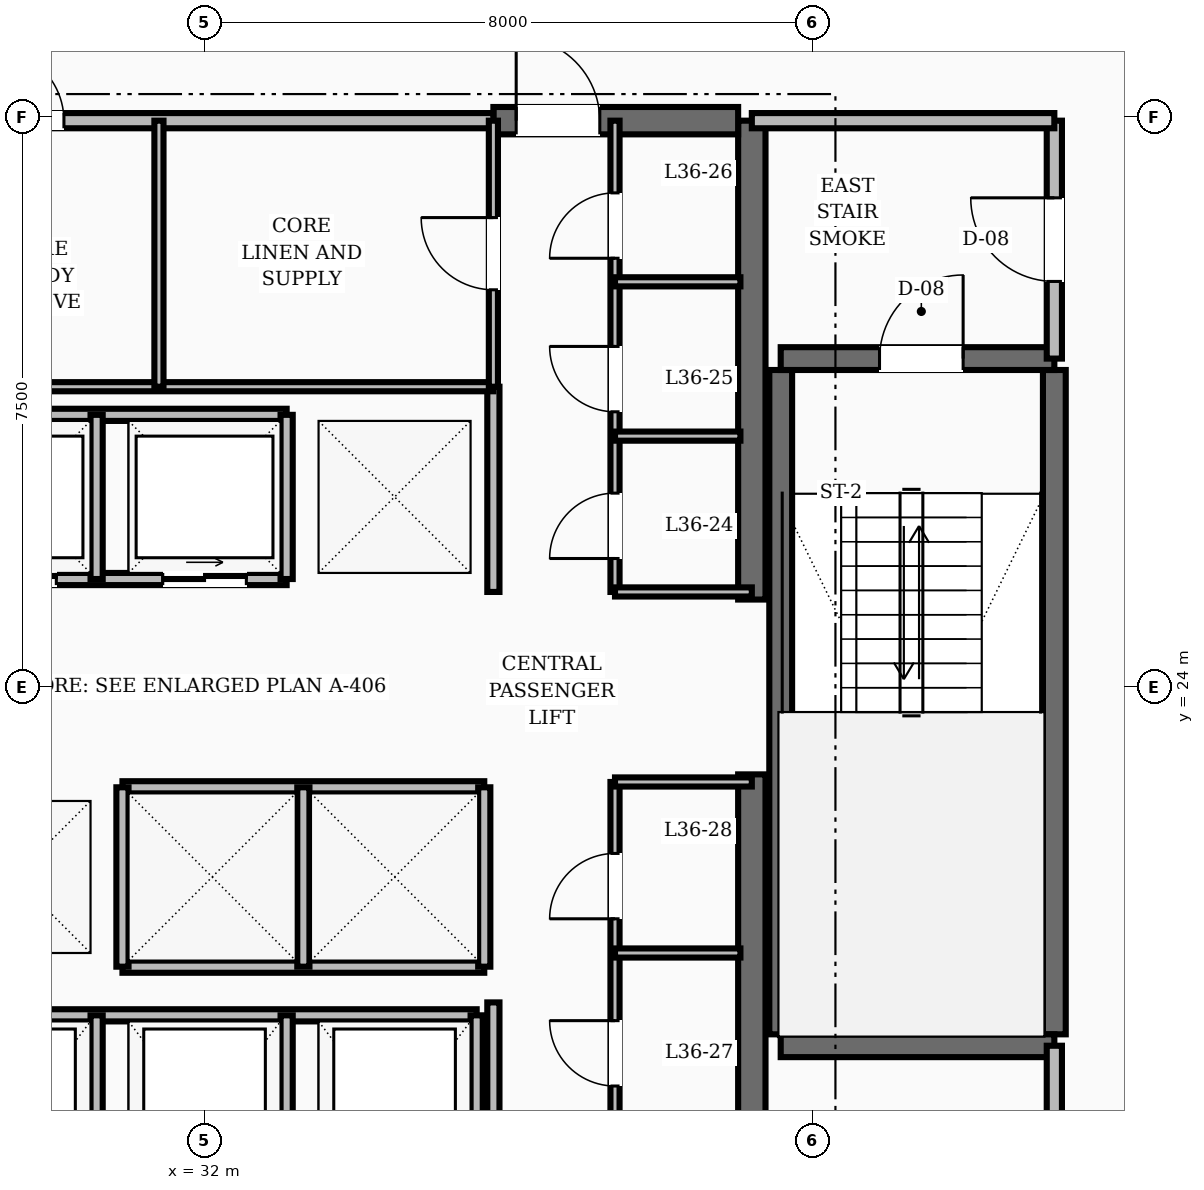
"""IFC4 building model, lengths in metres.
Left out: names, types, materials, properties, quantities, classifications, styles, units other than length and angle.
Written with IfcOpenShell. Run it as: python <this file> out.ifc"""

import sys

from ifc_helpers import new_model, si_unit, direction, frame, frame_2d, origin, place, context, subcontext, project, spatial, rectangle, extrude, element, fill, save


model = new_model("IFC4")
c1 = context("Model", 3, precision=1e-05, world=origin(), true_north=direction((0.0, 1.0)))
c2 = subcontext(c1, "Body", "Model", "MODEL_VIEW")
j1 = project(units=[si_unit("LENGTHUNIT", "METRE"), si_unit("PLANEANGLEUNIT", "RADIAN")], contexts=[c1])
p1 = place(None, origin())
s1 = spatial("IfcSite", under=j1, at=p1, CompositionType="ELEMENT")
p2 = place(p1, origin())
s2 = spatial("IfcBuilding", under=s1, at=p2, CompositionType="ELEMENT")
p3 = place(p2, frame((0.0, 0.0, 142.4)))
s3 = spatial("IfcBuildingStorey", under=s2, at=p3, CompositionType="ELEMENT", Elevation=142.4)
for number, where, z_axis, x_axis in (
    (1, (39.2, 16.55, 0.0), (0.0, 0.0, 1.0), (0.0, 1.0, 0.0)),
    (2, (39.2, 25.15, 0.0), (0.0, 0.0, 1.0), (0.0, 1.0, 0.0)),
):
    element("IfcWall", number, at=place(p3, frame(where, z_axis=z_axis, x_axis=x_axis)), inside=s3, PredefinedType="SHEAR", context=c2, shape_type="SweptSolid", body=[
        extrude(rectangle(XDim=6.3, YDim=0.36, at=frame_2d((3.15, 0.0))), origin(), (0.0, 0.0, 1.0), 3.6),
    ])
p4 = place(p3, frame((35.8, 31.45, 0.0), z_axis=(0.0, 0.0, 1.0), x_axis=(1.0, 0.0, 0.0)))
e3 = element("IfcWall", 3, at=p4, inside=s3, PredefinedType="SHEAR", context=c2, shape_type="SweptSolid", body=[
    extrude(rectangle(XDim=3.22, YDim=0.36, at=frame_2d((1.61, 0.0))), origin(), (0.0, 0.0, 1.0), 3.6),
])
p5 = place(p4, frame((0.3, 0.0, 0.0)))
e4 = element("IfcOpeningElement", 4, at=p5, cuts=e3, PredefinedType="OPENING", context=c2, shape_type="SweptSolid", body=[
    extrude(rectangle(XDim=1.1, YDim=2.1, at=frame_2d((0.55, 1.05))), frame((0.0, 0.19, 0.0), z_axis=(0.0, -1.0, 0.0), x_axis=(1.0, 0.0, 0.0)), (0.0, 0.0, 1.0), 0.38),
])
for number, where, z_axis, x_axis in (
    (5, (43.18, 19.43, 0.0), (0.0, 0.0, 1.0), (0.0, 1.0, 0.0)),
    (6, (39.58, 19.43, 0.0), (0.0, 0.0, 1.0), (0.0, 1.0, 0.0)),
):
    element("IfcWall", number, at=place(p3, frame(where, z_axis=z_axis, x_axis=x_axis)), inside=s3, PredefinedType="SHEAR", context=c2, shape_type="SweptSolid", body=[
        extrude(rectangle(XDim=8.74, YDim=0.3, at=frame_2d((4.37, 0.0))), origin(), (0.0, 0.0, 1.0), 3.6),
    ])
p6 = place(p3, frame((39.58, 19.28, 0.0), z_axis=(0.0, 0.0, 1.0), x_axis=(1.0, 0.0, 0.0)))
e7 = element("IfcWall", 7, at=p6, inside=s3, PredefinedType="SHEAR", context=c2, shape_type="SweptSolid", body=[
    extrude(rectangle(XDim=3.6, YDim=0.3, at=frame_2d((1.8, 0.0))), origin(), (0.0, 0.0, 1.0), 3.6),
])
p7 = place(p3, frame((39.58, 28.32, 0.0), z_axis=(0.0, 0.0, 1.0), x_axis=(1.0, 0.0, 0.0)))
e8 = element("IfcWall", 8, at=p7, inside=s3, PredefinedType="SHEAR", context=c2, shape_type="SweptSolid", body=[
    extrude(rectangle(XDim=3.6, YDim=0.3, at=frame_2d((1.8, 0.0))), origin(), (0.0, 0.0, 1.0), 3.6),
])
p8 = place(p7, frame((1.3, 0.0, 0.0)))
e9 = element("IfcOpeningElement", 9, at=p8, cuts=e8, PredefinedType="OPENING", context=c2, shape_type="SweptSolid", body=[
    extrude(rectangle(XDim=1.1, YDim=2.1, at=frame_2d((0.55, 1.05))), frame((0.0, 0.16, 0.0), z_axis=(0.0, -1.0, 0.0), x_axis=(1.0, 0.0, 0.0)), (0.0, 0.0, 1.0), 0.32),
])
p9 = place(p3, frame((43.18, 28.32, 0.0), z_axis=(0.0, 0.0, 1.0), x_axis=(0.0, 1.0, 0.0)))
e10 = element("IfcWall", 10, at=p9, inside=s3, PredefinedType="SOLIDWALL", context=c2, shape_type="SweptSolid", body=[
    extrude(rectangle(XDim=3.13, YDim=0.2, at=frame_2d((1.565, 0.0))), origin(), (0.0, 0.0, 1.0), 2.8),
])
p10 = place(p9, frame((1.015, 0.0, 0.0)))
e11 = element("IfcOpeningElement", 11, at=p10, cuts=e10, PredefinedType="OPENING", context=c2, shape_type="SweptSolid", body=[
    extrude(rectangle(XDim=1.1, YDim=2.1, at=frame_2d((0.55, 1.05))), frame((0.0, 0.11, 0.0), z_axis=(0.0, -1.0, 0.0), x_axis=(1.0, 0.0, 0.0)), (0.0, 0.0, 1.0), 0.22),
])
p11 = place(p3, frame((39.2, 31.45, 0.0), z_axis=(0.0, 0.0, 1.0), x_axis=(1.0, 0.0, 0.0)))
e12 = element("IfcWall", 12, at=p11, inside=s3, PredefinedType="SOLIDWALL", context=c2, shape_type="SweptSolid", body=[
    extrude(rectangle(XDim=3.98, YDim=0.2, at=frame_2d((1.99, 0.0))), origin(), (0.0, 0.0, 1.0), 2.8),
])
p12 = place(p3, frame((43.18, 16.55, 0.0), z_axis=(0.0, 0.0, 1.0), x_axis=(0.0, 1.0, 0.0)))
e13 = element("IfcWall", 13, at=p12, inside=s3, PredefinedType="SOLIDWALL", context=c2, shape_type="SweptSolid", body=[
    extrude(rectangle(XDim=2.73, YDim=0.2, at=frame_2d((1.365, 0.0))), origin(), (0.0, 0.0, 1.0), 2.8),
])
p13 = place(p12, frame((0.89, 0.0, 0.0)))
e14 = element("IfcOpeningElement", 14, at=p13, cuts=e13, PredefinedType="OPENING", context=c2, shape_type="SweptSolid", body=[
    extrude(rectangle(XDim=0.95, YDim=2.1, at=frame_2d((0.475, 1.05))), frame((0.0, 0.11, 0.0), z_axis=(0.0, -1.0, 0.0), x_axis=(1.0, 0.0, 0.0)), (0.0, 0.0, 1.0), 0.22),
])
p14 = place(p3, frame((35.8, 16.55, 0.0), z_axis=(0.0, 0.0, 1.0), x_axis=(0.0, 1.0, 0.0)))
e15 = element("IfcWall", 15, at=p14, inside=s3, PredefinedType="SOLIDWALL", context=c2, shape_type="SweptSolid", body=[
    extrude(rectangle(XDim=3.3, YDim=0.16, at=frame_2d((1.65, 0.0))), origin(), (0.0, 0.0, 1.0), 2.8),
])
p15 = place(p3, frame((35.8, 25.25, 0.0), z_axis=(0.0, 0.0, 1.0), x_axis=(0.0, 1.0, 0.0)))
e16 = element("IfcWall", 16, at=p15, inside=s3, PredefinedType="SOLIDWALL", context=c2, shape_type="SweptSolid", body=[
    extrude(rectangle(XDim=2.7, YDim=0.16, at=frame_2d((1.35, 0.0))), origin(), (0.0, 0.0, 1.0), 2.8),
])
p16 = place(p3, frame((28.42, 25.42, 0.0), z_axis=(0.0, 0.0, 1.0), x_axis=(1.0, 0.0, 0.0)))
e17 = element("IfcWall", 17, at=p16, inside=s3, PredefinedType="SOLIDWALL", context=c2, shape_type="SweptSolid", body=[
    extrude(rectangle(XDim=4.66, YDim=0.16, at=frame_2d((2.33, 0.0))), origin(), (0.0, 0.0, 1.0), 2.8),
])
p17 = place(p16, frame((0.53, 0.0, 0.0)))
e18 = element("IfcOpeningElement", 18, at=p17, cuts=e17, PredefinedType="OPENING", context=c2, shape_type="SweptSolid", body=[
    extrude(rectangle(XDim=1.1, YDim=2.15, at=frame_2d((0.55, 1.075))), frame((0.0, 0.09, 0.0), z_axis=(0.0, -1.0, 0.0), x_axis=(1.0, 0.0, 0.0)), (0.0, 0.0, 1.0), 0.18),
])
p18 = place(p16, frame((3.03, 0.0, 0.0)))
e19 = element("IfcOpeningElement", 19, at=p18, cuts=e17, PredefinedType="OPENING", context=c2, shape_type="SweptSolid", body=[
    extrude(rectangle(XDim=1.1, YDim=2.15, at=frame_2d((0.55, 1.075))), frame((0.0, 0.09, 0.0), z_axis=(0.0, -1.0, 0.0), x_axis=(1.0, 0.0, 0.0)), (0.0, 0.0, 1.0), 0.18),
])
p19 = place(p3, frame((28.42, 27.58, 0.0), z_axis=(0.0, 0.0, 1.0), x_axis=(1.0, 0.0, 0.0)))
e20 = element("IfcWall", 20, at=p19, inside=s3, PredefinedType="SOLIDWALL", context=c2, shape_type="SweptSolid", body=[
    extrude(rectangle(XDim=4.66, YDim=0.16, at=frame_2d((2.33, 0.0))), origin(), (0.0, 0.0, 1.0), 2.8),
])
for number, where, z_axis, x_axis in (
    (21, (30.58, 25.42, 0.0), (0.0, 0.0, 1.0), (0.0, 1.0, 0.0)),
    (22, (33.08, 25.42, 0.0), (0.0, 0.0, 1.0), (0.0, 1.0, 0.0)),
):
    element("IfcWall", number, at=place(p3, frame(where, z_axis=z_axis, x_axis=x_axis)), inside=s3, PredefinedType="SOLIDWALL", context=c2, shape_type="SweptSolid", body=[
        extrude(rectangle(XDim=2.16, YDim=0.16, at=frame_2d((1.08, 0.0))), origin(), (0.0, 0.0, 1.0), 2.8),
    ])
for number, where, z_axis, x_axis in (
    (23, (30.92, 22.68, 0.0), (0.0, 0.0, 1.0), (1.0, 0.0, 0.0)),
    (24, (30.92, 20.32, 0.0), (0.0, 0.0, 1.0), (1.0, 0.0, 0.0)),
):
    element("IfcWall", number, at=place(p3, frame(where, z_axis=z_axis, x_axis=x_axis)), inside=s3, PredefinedType="SOLIDWALL", context=c2, shape_type="SweptSolid", body=[
        extrude(rectangle(XDim=4.76, YDim=0.16, at=frame_2d((2.38, 0.0))), origin(), (0.0, 0.0, 1.0), 2.8),
    ])
for number, where, z_axis, x_axis in (
    (25, (30.92, 20.32, 0.0), (0.0, 0.0, 1.0), (0.0, 1.0, 0.0)),
    (26, (33.3, 20.32, 0.0), (0.0, 0.0, 1.0), (0.0, 1.0, 0.0)),
    (27, (35.68, 20.32, 0.0), (0.0, 0.0, 1.0), (0.0, 1.0, 0.0)),
):
    element("IfcWall", number, at=place(p3, frame(where, z_axis=z_axis, x_axis=x_axis)), inside=s3, PredefinedType="SOLIDWALL", context=c2, shape_type="SweptSolid", body=[
        extrude(rectangle(XDim=2.36, YDim=0.16, at=frame_2d((1.18, 0.0))), origin(), (0.0, 0.0, 1.0), 2.8),
    ])
p20 = place(p3, frame((28.42, 19.68, 0.0), z_axis=(0.0, 0.0, 1.0), x_axis=(1.0, 0.0, 0.0)))
e28 = element("IfcWall", 28, at=p20, inside=s3, PredefinedType="SOLIDWALL", context=c2, shape_type="SweptSolid", body=[
    extrude(rectangle(XDim=7.16, YDim=0.16, at=frame_2d((3.58, 0.0))), origin(), (0.0, 0.0, 1.0), 2.8),
])
for number, where, z_axis, x_axis in (
    (29, (30.58, 16.92, 0.0), (0.0, 0.0, 1.0), (0.0, 1.0, 0.0)),
    (30, (33.08, 16.92, 0.0), (0.0, 0.0, 1.0), (0.0, 1.0, 0.0)),
    (31, (35.58, 16.92, 0.0), (0.0, 0.0, 1.0), (0.0, 1.0, 0.0)),
):
    element("IfcWall", number, at=place(p3, frame(where, z_axis=z_axis, x_axis=x_axis)), inside=s3, PredefinedType="SOLIDWALL", context=c2, shape_type="SweptSolid", body=[
        extrude(rectangle(XDim=2.76, YDim=0.16, at=frame_2d((1.38, 0.0))), origin(), (0.0, 0.0, 1.0), 2.8),
    ])
p21 = place(p3, frame((28.2, 31.45, 0.0), z_axis=(0.0, 0.0, 1.0), x_axis=(1.0, 0.0, 0.0)))
e32 = element("IfcWall", 32, at=p21, inside=s3, PredefinedType="SOLIDWALL", context=c2, shape_type="SweptSolid", body=[
    extrude(rectangle(XDim=7.6, YDim=0.2, at=frame_2d((3.8, 0.0))), origin(), (0.0, 0.0, 1.0), 2.8),
])
p22 = place(p21, frame((1.0, 0.0, 0.0)))
e33 = element("IfcOpeningElement", 33, at=p22, cuts=e32, PredefinedType="OPENING", context=c2, shape_type="SweptSolid", body=[
    extrude(rectangle(XDim=0.95, YDim=2.1, at=frame_2d((0.475, 1.05))), frame((0.0, 0.11, 0.0), z_axis=(0.0, -1.0, 0.0), x_axis=(1.0, 0.0, 0.0)), (0.0, 0.0, 1.0), 0.22),
])
p23 = place(p3, frame((28.2, 27.95, 0.0), z_axis=(0.0, 0.0, 1.0), x_axis=(1.0, 0.0, 0.0)))
e34 = element("IfcWall", 34, at=p23, inside=s3, PredefinedType="PARTITIONING", context=c2, shape_type="SweptSolid", body=[
    extrude(rectangle(XDim=7.6, YDim=0.12, at=frame_2d((3.8, 0.0))), origin(), (0.0, 0.0, 1.0), 2.8),
])
p24 = place(p3, frame((35.8, 27.95, 0.0), z_axis=(0.0, 0.0, 1.0), x_axis=(0.0, 1.0, 0.0)))
e35 = element("IfcWall", 35, at=p24, inside=s3, PredefinedType="PARTITIONING", context=c2, shape_type="SweptSolid", body=[
    extrude(rectangle(XDim=3.5, YDim=0.12, at=frame_2d((1.75, 0.0))), origin(), (0.0, 0.0, 1.0), 2.8),
])
p25 = place(p24, frame((1.275, 0.0, 0.0)))
e36 = element("IfcOpeningElement", 36, at=p25, cuts=e35, PredefinedType="OPENING", context=c2, shape_type="SweptSolid", body=[
    extrude(rectangle(XDim=0.95, YDim=2.1, at=frame_2d((0.475, 1.05))), frame((0.0, 0.07, 0.0), z_axis=(0.0, -1.0, 0.0), x_axis=(1.0, 0.0, 0.0)), (0.0, 0.0, 1.0), 0.14),
])
p26 = place(p3, frame((31.4, 27.95, 0.0), z_axis=(0.0, 0.0, 1.0), x_axis=(0.0, 1.0, 0.0)))
e37 = element("IfcWall", 37, at=p26, inside=s3, PredefinedType="PARTITIONING", context=c2, shape_type="SweptSolid", body=[
    extrude(rectangle(XDim=3.5, YDim=0.12, at=frame_2d((1.75, 0.0))), origin(), (0.0, 0.0, 1.0), 2.8),
])
p27 = place(p3, frame((37.4, 25.25, 0.0), z_axis=(0.0, 0.0, 1.0), x_axis=(0.0, 1.0, 0.0)))
e38 = element("IfcWall", 38, at=p27, inside=s3, PredefinedType="PARTITIONING", context=c2, shape_type="SweptSolid", body=[
    extrude(rectangle(XDim=6.2, YDim=0.12, at=frame_2d((3.1, 0.0))), origin(), (0.0, 0.0, 1.0), 2.8),
])
p28 = place(p27, frame((0.44, 0.0, 0.0)))
e39 = element("IfcOpeningElement", 39, at=p28, cuts=e38, PredefinedType="OPENING", context=c2, shape_type="SweptSolid", body=[
    extrude(rectangle(XDim=0.86, YDim=2.1, at=frame_2d((0.43, 1.05))), frame((0.0, 0.07, 0.0), z_axis=(0.0, -1.0, 0.0), x_axis=(1.0, 0.0, 0.0)), (0.0, 0.0, 1.0), 0.14),
])
p29 = place(p27, frame((2.37, 0.0, 0.0)))
e40 = element("IfcOpeningElement", 40, at=p29, cuts=e38, PredefinedType="OPENING", context=c2, shape_type="SweptSolid", body=[
    extrude(rectangle(XDim=0.86, YDim=2.1, at=frame_2d((0.43, 1.05))), frame((0.0, 0.07, 0.0), z_axis=(0.0, -1.0, 0.0), x_axis=(1.0, 0.0, 0.0)), (0.0, 0.0, 1.0), 0.14),
])
p30 = place(p27, frame((4.39, 0.0, 0.0)))
e41 = element("IfcOpeningElement", 41, at=p30, cuts=e38, PredefinedType="OPENING", context=c2, shape_type="SweptSolid", body=[
    extrude(rectangle(XDim=0.86, YDim=2.1, at=frame_2d((0.43, 1.05))), frame((0.0, 0.07, 0.0), z_axis=(0.0, -1.0, 0.0), x_axis=(1.0, 0.0, 0.0)), (0.0, 0.0, 1.0), 0.14),
])
p31 = place(p3, frame((37.4, 25.25, 0.0), z_axis=(0.0, 0.0, 1.0), x_axis=(1.0, 0.0, 0.0)))
e42 = element("IfcWall", 42, at=p31, inside=s3, PredefinedType="PARTITIONING", context=c2, shape_type="SweptSolid", body=[
    extrude(rectangle(XDim=1.8, YDim=0.12, at=frame_2d((0.9, 0.0))), origin(), (0.0, 0.0, 1.0), 2.8),
])
p32 = place(p3, frame((37.4, 18.3, 0.0), z_axis=(0.0, 0.0, 1.0), x_axis=(0.0, 1.0, 0.0)))
e43 = element("IfcWall", 43, at=p32, inside=s3, PredefinedType="PARTITIONING", context=c2, shape_type="SweptSolid", body=[
    extrude(rectangle(XDim=4.45, YDim=0.12, at=frame_2d((2.225, 0.0))), origin(), (0.0, 0.0, 1.0), 2.8),
])
p33 = place(p32, frame((0.45, 0.0, 0.0)))
e44 = element("IfcOpeningElement", 44, at=p33, cuts=e43, PredefinedType="OPENING", context=c2, shape_type="SweptSolid", body=[
    extrude(rectangle(XDim=0.86, YDim=2.1, at=frame_2d((0.43, 1.05))), frame((0.0, 0.07, 0.0), z_axis=(0.0, -1.0, 0.0), x_axis=(1.0, 0.0, 0.0)), (0.0, 0.0, 1.0), 0.14),
])
p34 = place(p32, frame((2.65, 0.0, 0.0)))
e45 = element("IfcOpeningElement", 45, at=p34, cuts=e43, PredefinedType="OPENING", context=c2, shape_type="SweptSolid", body=[
    extrude(rectangle(XDim=0.86, YDim=2.1, at=frame_2d((0.43, 1.05))), frame((0.0, 0.07, 0.0), z_axis=(0.0, -1.0, 0.0), x_axis=(1.0, 0.0, 0.0)), (0.0, 0.0, 1.0), 0.14),
])
p35 = place(p3, frame((37.4, 22.75, 0.0), z_axis=(0.0, 0.0, 1.0), x_axis=(1.0, 0.0, 0.0)))
e46 = element("IfcWall", 46, at=p35, inside=s3, PredefinedType="PARTITIONING", context=c2, shape_type="SweptSolid", body=[
    extrude(rectangle(XDim=1.8, YDim=0.12, at=frame_2d((0.9, 0.0))), origin(), (0.0, 0.0, 1.0), 2.8),
])
for number, where, z_axis, x_axis in (
    (47, (37.4, 27.3, 0.0), (0.0, 0.0, 1.0), (1.0, 0.0, 0.0)),
    (48, (37.4, 29.33, 0.0), (0.0, 0.0, 1.0), (1.0, 0.0, 0.0)),
    (49, (37.4, 20.5, 0.0), (0.0, 0.0, 1.0), (1.0, 0.0, 0.0)),
):
    element("IfcWall", number, at=place(p3, frame(where, z_axis=z_axis, x_axis=x_axis)), inside=s3, PredefinedType="PARTITIONING", context=c2, shape_type="SweptSolid", body=[
        extrude(rectangle(XDim=1.65, YDim=0.12, at=frame_2d((0.825, 0.0))), origin(), (0.0, 0.0, 1.0), 2.8),
    ])
p36 = place(p8, origin())
e50 = element("IfcDoor", 50, at=p36, inside=s3, OperationType="SINGLE_SWING_RIGHT", PredefinedType="DOOR", context=c2, shape_type="SweptSolid", body=[
    extrude(rectangle(XDim=1.1, YDim=2.1, at=frame_2d((0.55, 1.05))), frame((0.0, 0.025, 0.0), z_axis=(0.0, -1.0, 0.0), x_axis=(1.0, 0.0, 0.0)), (0.0, 0.0, 1.0), 0.05),
])
fill(e9, e50)
p37 = place(p10, origin())
e51 = element("IfcDoor", 51, at=p37, inside=s3, OperationType="SINGLE_SWING_RIGHT", PredefinedType="DOOR", context=c2, shape_type="SweptSolid", body=[
    extrude(rectangle(XDim=1.1, YDim=2.1, at=frame_2d((0.55, 1.05))), frame((0.0, 0.025, 0.0), z_axis=(0.0, -1.0, 0.0), x_axis=(1.0, 0.0, 0.0)), (0.0, 0.0, 1.0), 0.05),
])
fill(e11, e51)
p38 = place(p5, origin())
e52 = element("IfcDoor", 52, at=p38, inside=s3, OperationType="SINGLE_SWING_LEFT", PredefinedType="DOOR", context=c2, shape_type="SweptSolid", body=[
    extrude(rectangle(XDim=1.1, YDim=2.1, at=frame_2d((0.55, 1.05))), frame((0.0, 0.025, 0.0), z_axis=(0.0, -1.0, 0.0), x_axis=(1.0, 0.0, 0.0)), (0.0, 0.0, 1.0), 0.05),
])
fill(e4, e52)
p39 = place(p17, origin())
e53 = element("IfcDoor", 53, at=p39, inside=s3, OperationType="SLIDING_TO_RIGHT", PredefinedType="DOOR", context=c2, shape_type="SweptSolid", body=[
    extrude(rectangle(XDim=1.1, YDim=2.15, at=frame_2d((0.55, 1.075))), frame((0.0, 0.025, 0.0), z_axis=(0.0, -1.0, 0.0), x_axis=(1.0, 0.0, 0.0)), (0.0, 0.0, 1.0), 0.05),
])
fill(e18, e53)
p40 = place(p18, origin())
e54 = element("IfcDoor", 54, at=p40, inside=s3, OperationType="SLIDING_TO_RIGHT", PredefinedType="DOOR", context=c2, shape_type="SweptSolid", body=[
    extrude(rectangle(XDim=1.1, YDim=2.15, at=frame_2d((0.55, 1.075))), frame((0.0, 0.025, 0.0), z_axis=(0.0, -1.0, 0.0), x_axis=(1.0, 0.0, 0.0)), (0.0, 0.0, 1.0), 0.05),
])
fill(e19, e54)
p41 = place(p22, origin())
e55 = element("IfcDoor", 55, at=p41, inside=s3, OperationType="SINGLE_SWING_LEFT", PredefinedType="DOOR", context=c2, shape_type="SweptSolid", body=[
    extrude(rectangle(XDim=0.95, YDim=2.1, at=frame_2d((0.475, 1.05))), frame((0.0, 0.025, 0.0), z_axis=(0.0, -1.0, 0.0), x_axis=(1.0, 0.0, 0.0)), (0.0, 0.0, 1.0), 0.05),
])
fill(e33, e55)
p42 = place(p25, origin())
e56 = element("IfcDoor", 56, at=p42, inside=s3, OperationType="SINGLE_SWING_RIGHT", PredefinedType="DOOR", context=c2, shape_type="SweptSolid", body=[
    extrude(rectangle(XDim=0.95, YDim=2.1, at=frame_2d((0.475, 1.05))), frame((0.0, 0.025, 0.0), z_axis=(0.0, -1.0, 0.0), x_axis=(1.0, 0.0, 0.0)), (0.0, 0.0, 1.0), 0.05),
])
fill(e36, e56)
p43 = place(p28, origin())
e57 = element("IfcDoor", 57, at=p43, inside=s3, OperationType="SINGLE_SWING_LEFT", PredefinedType="DOOR", context=c2, shape_type="SweptSolid", body=[
    extrude(rectangle(XDim=0.86, YDim=2.1, at=frame_2d((0.43, 1.05))), frame((0.0, 0.025, 0.0), z_axis=(0.0, -1.0, 0.0), x_axis=(1.0, 0.0, 0.0)), (0.0, 0.0, 1.0), 0.05),
])
fill(e39, e57)
p44 = place(p29, origin())
e58 = element("IfcDoor", 58, at=p44, inside=s3, OperationType="SINGLE_SWING_RIGHT", PredefinedType="DOOR", context=c2, shape_type="SweptSolid", body=[
    extrude(rectangle(XDim=0.86, YDim=2.1, at=frame_2d((0.43, 1.05))), frame((0.0, 0.025, 0.0), z_axis=(0.0, -1.0, 0.0), x_axis=(1.0, 0.0, 0.0)), (0.0, 0.0, 1.0), 0.05),
])
fill(e40, e58)
p45 = place(p30, origin())
e59 = element("IfcDoor", 59, at=p45, inside=s3, OperationType="SINGLE_SWING_LEFT", PredefinedType="DOOR", context=c2, shape_type="SweptSolid", body=[
    extrude(rectangle(XDim=0.86, YDim=2.1, at=frame_2d((0.43, 1.05))), frame((0.0, 0.025, 0.0), z_axis=(0.0, -1.0, 0.0), x_axis=(1.0, 0.0, 0.0)), (0.0, 0.0, 1.0), 0.05),
])
fill(e41, e59)
p46 = place(p33, origin())
e60 = element("IfcDoor", 60, at=p46, inside=s3, OperationType="SINGLE_SWING_RIGHT", PredefinedType="DOOR", context=c2, shape_type="SweptSolid", body=[
    extrude(rectangle(XDim=0.86, YDim=2.1, at=frame_2d((0.43, 1.05))), frame((0.0, 0.025, 0.0), z_axis=(0.0, -1.0, 0.0), x_axis=(1.0, 0.0, 0.0)), (0.0, 0.0, 1.0), 0.05),
])
fill(e44, e60)
p47 = place(p34, origin())
e61 = element("IfcDoor", 61, at=p47, inside=s3, OperationType="SINGLE_SWING_LEFT", PredefinedType="DOOR", context=c2, shape_type="SweptSolid", body=[
    extrude(rectangle(XDim=0.86, YDim=2.1, at=frame_2d((0.43, 1.05))), frame((0.0, 0.025, 0.0), z_axis=(0.0, -1.0, 0.0), x_axis=(1.0, 0.0, 0.0)), (0.0, 0.0, 1.0), 0.05),
])
fill(e45, e61)
save(model, sys.argv[1])
